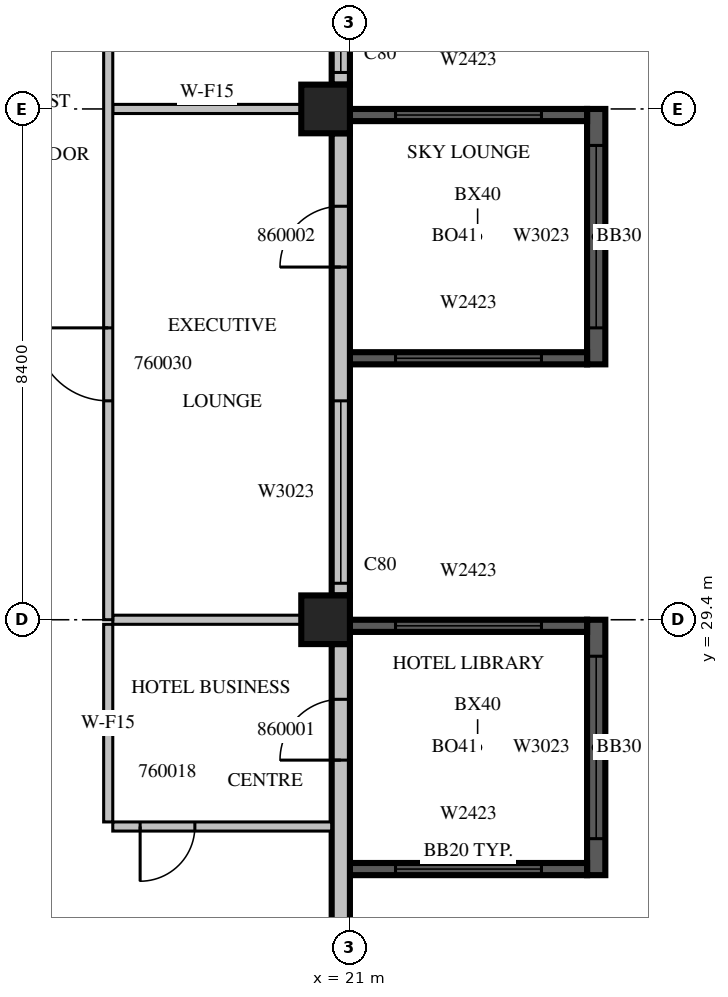
"""IFC4 building model, lengths in metres.
Left out: names, types, materials, properties, quantities, classifications, styles, units other than length and angle.
Written with IfcOpenShell. Run it as: python <this file> out.ifc"""

import sys

from ifc_helpers import new_model, si_unit, direction, frame, frame_2d, origin, origin_2d, place, context, subcontext, project, spatial, rectangle, extrude, source, transform, mapped, element, fill, save


model = new_model("IFC4")
c1 = context("Model", 3, precision=1e-05, world=origin(), true_north=direction((0.0, 1.0)))
c2 = subcontext(c1, "Body", "Model", "MODEL_VIEW")
j1 = project(units=[si_unit("LENGTHUNIT", "METRE"), si_unit("PLANEANGLEUNIT", "RADIAN")], contexts=[c1])
p1 = place(None, origin())
s1 = spatial("IfcSite", under=j1, at=p1, CompositionType="ELEMENT")
p2 = place(p1, origin())
s2 = spatial("IfcBuilding", under=s1, at=p2, CompositionType="ELEMENT")
p3 = place(p2, frame((0.0, 0.0, 261.4)))
s3 = spatial("IfcBuildingStorey", under=s2, at=p3, CompositionType="ELEMENT", Elevation=261.4)
m1 = source(origin(), c2, "Body", "SweptSolid", [
    extrude(rectangle(XDim=0.8, YDim=0.8, at=origin_2d()), origin(), (0.0, 0.0, 1.0), 3.8),
])
for number, where, z_axis, x_axis in (
    (1, (20.6, 29.4, 0.0), (0.0, 0.0, 1.0), (1.0, 0.0, 0.0)),
    (2, (20.6, 37.8, 0.0), (0.0, 0.0, 1.0), (1.0, 0.0, 0.0)),
):
    element("IfcColumn", number, at=place(p3, frame(where, z_axis=z_axis, x_axis=x_axis)), inside=s3, PredefinedType="COLUMN", context=c2, shape_type="MappedRepresentation", body=[
        mapped(m1, transform((0.0, 0.0, 0.0), scale=1.0)),
    ])
m2 = source(origin(), c2, "Body", "SweptSolid", [
    extrude(rectangle(XDim=4.2, YDim=0.3, at=frame_2d((2.1, 0.0))), origin(), (0.0, 0.0, 1.0), 3.4),
])
p4 = place(p3, frame((25.05, 25.2, 0.0), z_axis=(0.0, 0.0, 1.0), x_axis=(0.0, 1.0, 0.0)))
e3 = element("IfcWall", 3, at=p4, inside=s3, PredefinedType="SOLIDWALL", context=c2, shape_type="MappedRepresentation", body=[
    mapped(m2, transform((0.0, 0.0, 0.0), scale=1.0)),
])
m3 = source(origin(), c2, "Body", "SweptSolid", [
    extrude(rectangle(XDim=3.0, YDim=2.3, at=frame_2d((1.5, 1.15))), frame((0.0, 0.16, 0.0), z_axis=(0.0, -1.0, 0.0), x_axis=(1.0, 0.0, 0.0)), (0.0, 0.0, 1.0), 0.32),
])
p5 = place(p4, frame((0.6, 0.0, 0.6)))
e4 = element("IfcOpeningElement", 4, at=p5, cuts=e3, PredefinedType="OPENING", context=c2, shape_type="MappedRepresentation", body=[
    mapped(m3, transform((0.0, 0.0, 0.0), scale=1.0)),
])
m4 = source(origin(), c2, "Body", "SweptSolid", [
    extrude(rectangle(XDim=3.9, YDim=0.2, at=frame_2d((1.95, 0.0))), origin(), (0.0, 0.0, 1.0), 3.4),
])
p6 = place(p3, frame((21.0, 25.3, 0.0), z_axis=(0.0, 0.0, 1.0), x_axis=(1.0, 0.0, 0.0)))
e5 = element("IfcWall", 5, at=p6, inside=s3, PredefinedType="SOLIDWALL", context=c2, shape_type="MappedRepresentation", body=[
    mapped(m4, transform((0.0, 0.0, 0.0), scale=1.0)),
])
m5 = source(origin(), c2, "Body", "SweptSolid", [
    extrude(rectangle(XDim=2.4, YDim=2.3, at=frame_2d((1.2, 1.15))), frame((0.0, 0.11, 0.0), z_axis=(0.0, -1.0, 0.0), x_axis=(1.0, 0.0, 0.0)), (0.0, 0.0, 1.0), 0.22),
])
p7 = place(p6, frame((0.75, 0.0, 0.6)))
e6 = element("IfcOpeningElement", 6, at=p7, cuts=e5, PredefinedType="OPENING", context=c2, shape_type="MappedRepresentation", body=[
    mapped(m5, transform((0.0, 0.0, 0.0), scale=1.0)),
])
p8 = place(p3, frame((21.0, 29.3, 0.0), z_axis=(0.0, 0.0, 1.0), x_axis=(1.0, 0.0, 0.0)))
e7 = element("IfcWall", 7, at=p8, inside=s3, PredefinedType="SOLIDWALL", context=c2, shape_type="MappedRepresentation", body=[
    mapped(m4, transform((0.0, 0.0, 0.0), scale=1.0)),
])
p9 = place(p8, frame((0.75, 0.0, 0.6)))
e8 = element("IfcOpeningElement", 8, at=p9, cuts=e7, PredefinedType="OPENING", context=c2, shape_type="MappedRepresentation", body=[
    mapped(m5, transform((0.0, 0.0, 0.0), scale=1.0)),
])
p10 = place(p3, frame((25.05, 33.6, 0.0), z_axis=(0.0, 0.0, 1.0), x_axis=(0.0, 1.0, 0.0)))
e9 = element("IfcWall", 9, at=p10, inside=s3, PredefinedType="SOLIDWALL", context=c2, shape_type="MappedRepresentation", body=[
    mapped(m2, transform((0.0, 0.0, 0.0), scale=1.0)),
])
p11 = place(p10, frame((0.6, 0.0, 0.6)))
e10 = element("IfcOpeningElement", 10, at=p11, cuts=e9, PredefinedType="OPENING", context=c2, shape_type="MappedRepresentation", body=[
    mapped(m3, transform((0.0, 0.0, 0.0), scale=1.0)),
])
p12 = place(p3, frame((21.0, 33.7, 0.0), z_axis=(0.0, 0.0, 1.0), x_axis=(1.0, 0.0, 0.0)))
e11 = element("IfcWall", 11, at=p12, inside=s3, PredefinedType="SOLIDWALL", context=c2, shape_type="MappedRepresentation", body=[
    mapped(m4, transform((0.0, 0.0, 0.0), scale=1.0)),
])
p13 = place(p12, frame((0.75, 0.0, 0.6)))
e12 = element("IfcOpeningElement", 12, at=p13, cuts=e11, PredefinedType="OPENING", context=c2, shape_type="MappedRepresentation", body=[
    mapped(m5, transform((0.0, 0.0, 0.0), scale=1.0)),
])
p14 = place(p3, frame((21.0, 37.7, 0.0), z_axis=(0.0, 0.0, 1.0), x_axis=(1.0, 0.0, 0.0)))
e13 = element("IfcWall", 13, at=p14, inside=s3, PredefinedType="SOLIDWALL", context=c2, shape_type="MappedRepresentation", body=[
    mapped(m4, transform((0.0, 0.0, 0.0), scale=1.0)),
])
p15 = place(p14, frame((0.75, 0.0, 0.6)))
e14 = element("IfcOpeningElement", 14, at=p15, cuts=e13, PredefinedType="OPENING", context=c2, shape_type="MappedRepresentation", body=[
    mapped(m5, transform((0.0, 0.0, 0.0), scale=1.0)),
])
m6 = source(origin(), c2, "Body", "SweptSolid", [
    extrude(rectangle(XDim=7.2, YDim=0.3, at=frame_2d((3.6, 0.0))), origin(), (0.0, 0.0, 1.0), 3.4),
])
p16 = place(p3, frame((20.85, 21.8, 0.0), z_axis=(0.0, 0.0, 1.0), x_axis=(0.0, 1.0, 0.0)))
e15 = element("IfcWall", 15, at=p16, inside=s3, PredefinedType="STANDARD", context=c2, shape_type="MappedRepresentation", body=[
    mapped(m6, transform((0.0, 0.0, 0.0), scale=1.0)),
])
m7 = source(origin(), c2, "Body", "SweptSolid", [
    extrude(rectangle(XDim=1.8, YDim=2.3, at=frame_2d((0.9, 1.15))), frame((0.0, 0.16, 0.0), z_axis=(0.0, -1.0, 0.0), x_axis=(1.0, 0.0, 0.0)), (0.0, 0.0, 1.0), 0.32),
])
p17 = place(p16, frame((0.4, 0.0, 0.6)))
e16 = element("IfcOpeningElement", 16, at=p17, cuts=e15, PredefinedType="OPENING", context=c2, shape_type="MappedRepresentation", body=[
    mapped(m7, transform((0.0, 0.0, 0.0), scale=1.0)),
])
m8 = source(origin(), c2, "Body", "SweptSolid", [
    extrude(rectangle(XDim=1.0, YDim=2.1, at=frame_2d((0.5, 1.05))), frame((0.0, 0.16, 0.0), z_axis=(0.0, -1.0, 0.0), x_axis=(1.0, 0.0, 0.0)), (0.0, 0.0, 1.0), 0.32),
])
p18 = place(p16, frame((5.292, 0.0, 0.0)))
e17 = element("IfcOpeningElement", 17, at=p18, cuts=e15, PredefinedType="OPENING", context=c2, shape_type="MappedRepresentation", body=[
    mapped(m8, transform((0.0, 0.0, 0.0), scale=1.0)),
])
m9 = source(origin(), c2, "Body", "SweptSolid", [
    extrude(rectangle(XDim=7.6, YDim=0.3, at=frame_2d((3.8, 0.0))), origin(), (0.0, 0.0, 1.0), 3.4),
])
p19 = place(p3, frame((20.85, 29.8, 0.0), z_axis=(0.0, 0.0, 1.0), x_axis=(0.0, 1.0, 0.0)))
e18 = element("IfcWall", 18, at=p19, inside=s3, PredefinedType="STANDARD", context=c2, shape_type="MappedRepresentation", body=[
    mapped(m9, transform((0.0, 0.0, 0.0), scale=1.0)),
])
p20 = place(p19, frame((0.2, 0.0, 0.6)))
e19 = element("IfcOpeningElement", 19, at=p20, cuts=e18, PredefinedType="OPENING", context=c2, shape_type="MappedRepresentation", body=[
    mapped(m3, transform((0.0, 0.0, 0.0), scale=1.0)),
])
p21 = place(p19, frame((5.4, 0.0, 0.0)))
e20 = element("IfcOpeningElement", 20, at=p21, cuts=e18, PredefinedType="OPENING", context=c2, shape_type="MappedRepresentation", body=[
    mapped(m8, transform((0.0, 0.0, 0.0), scale=1.0)),
])
m10 = source(origin(), c2, "Body", "SweptSolid", [
    extrude(rectangle(XDim=3.8, YDim=0.3, at=frame_2d((1.9, 0.0))), origin(), (0.0, 0.0, 1.0), 3.4),
])
p22 = place(p3, frame((20.85, 38.2, 0.0), z_axis=(0.0, 0.0, 1.0), x_axis=(0.0, 1.0, 0.0)))
e21 = element("IfcWall", 21, at=p22, inside=s3, PredefinedType="STANDARD", context=c2, shape_type="MappedRepresentation", body=[
    mapped(m10, transform((0.0, 0.0, 0.0), scale=1.0)),
])
p23 = place(p22, frame((0.2, 0.0, 0.6)))
e22 = element("IfcOpeningElement", 22, at=p23, cuts=e21, PredefinedType="OPENING", context=c2, shape_type="MappedRepresentation", body=[
    mapped(m3, transform((0.0, 0.0, 0.0), scale=1.0)),
])
m11 = source(origin(), c2, "Body", "SweptSolid", [
    extrude(rectangle(XDim=3.6, YDim=0.15, at=frame_2d((1.8, 0.0))), origin(), (0.0, 0.0, 1.0), 3.4),
])
p24 = place(p3, frame((17.1, 26.0, 0.0), z_axis=(0.0, 0.0, 1.0), x_axis=(1.0, 0.0, 0.0)))
e23 = element("IfcWall", 23, at=p24, inside=s3, PredefinedType="PARTITIONING", context=c2, shape_type="MappedRepresentation", body=[
    mapped(m11, transform((0.0, 0.0, 0.0), scale=1.0)),
])
m12 = source(origin(), c2, "Body", "SweptSolid", [
    extrude(rectangle(XDim=0.9, YDim=2.1, at=frame_2d((0.45, 1.05))), frame((0.0, 0.085, 0.0), z_axis=(0.0, -1.0, 0.0), x_axis=(1.0, 0.0, 0.0)), (0.0, 0.0, 1.0), 0.17),
])
p25 = place(p24, frame((0.45, 0.0, 0.0)))
e24 = element("IfcOpeningElement", 24, at=p25, cuts=e23, PredefinedType="OPENING", context=c2, shape_type="MappedRepresentation", body=[
    mapped(m12, transform((0.0, 0.0, 0.0), scale=1.0)),
])
m13 = source(origin(), c2, "Body", "SweptSolid", [
    extrude(rectangle(XDim=3.25, YDim=0.15, at=frame_2d((1.625, 0.0))), origin(), (0.0, 0.0, 1.0), 3.4),
])
p26 = place(p3, frame((17.025, 29.325, 0.0), z_axis=(0.0, 0.0, 1.0), x_axis=(0.0, -1.0, 0.0)))
e25 = element("IfcWall", 25, at=p26, inside=s3, PredefinedType="PARTITIONING", context=c2, shape_type="MappedRepresentation", body=[
    mapped(m13, transform((0.0, 0.0, 0.0), scale=1.0)),
])
m14 = source(origin(), c2, "Body", "SweptSolid", [
    extrude(rectangle(XDim=3.101, YDim=0.15, at=frame_2d((1.55, 0.0))), origin(), (0.0, 0.0, 1.0), 3.4),
])
for number, where, z_axis, x_axis in (
    (26, (20.201, 29.4, 0.0), (0.0, 0.0, 1.0), (-1.0, 0.0, 0.0)),
    (27, (20.201, 37.8, 0.0), (0.0, 0.0, 1.0), (-1.0, 0.0, 0.0)),
):
    element("IfcWall", number, at=place(p3, frame(where, z_axis=z_axis, x_axis=x_axis)), inside=s3, PredefinedType="PARTITIONING", context=c2, shape_type="MappedRepresentation", body=[
        mapped(m14, transform((0.0, 0.0, 0.0), scale=1.0)),
    ])
m15 = source(origin(), c2, "Body", "SweptSolid", [
    extrude(rectangle(XDim=19.86, YDim=0.15, at=frame_2d((9.93, 0.0))), origin(), (0.0, 0.0, 1.0), 3.4),
])
p27 = place(p3, frame((17.025, 49.26, 0.0), z_axis=(0.0, 0.0, 1.0), x_axis=(0.0, -1.0, 0.0)))
e28 = element("IfcWall", 28, at=p27, inside=s3, PredefinedType="PARTITIONING", context=c2, shape_type="MappedRepresentation", body=[
    mapped(m15, transform((0.0, 0.0, 0.0), scale=1.0)),
])
m16 = source(origin(), c2, "Body", "SweptSolid", [
    extrude(rectangle(XDim=1.2, YDim=2.1, at=frame_2d((0.6, 1.05))), frame((0.0, 0.085, 0.0), z_axis=(0.0, -1.0, 0.0), x_axis=(1.0, 0.0, 0.0)), (0.0, 0.0, 1.0), 0.17),
])
p28 = place(p27, frame((15.06, 0.0, 0.0)))
e29 = element("IfcOpeningElement", 29, at=p28, cuts=e28, PredefinedType="OPENING", context=c2, shape_type="MappedRepresentation", body=[
    mapped(m16, transform((0.0, 0.0, 0.0), scale=1.0)),
])
m17 = source(origin(), c2, "Body", "SweptSolid", [
    extrude(rectangle(XDim=1.0, YDim=2.1, at=frame_2d((0.5, 1.05))), frame((0.0, 0.085, 0.0), z_axis=(0.0, -1.0, 0.0), x_axis=(1.0, 0.0, 0.0)), (0.0, 0.0, 1.0), 0.17),
])
p29 = place(p27, frame((6.63, 0.0, 0.0)))
e30 = element("IfcOpeningElement", 30, at=p29, cuts=e28, PredefinedType="OPENING", context=c2, shape_type="MappedRepresentation", body=[
    mapped(m17, transform((0.0, 0.0, 0.0), scale=1.0)),
])
m18 = source(origin(), c2, "Body", "SweptSolid", [
    extrude(rectangle(XDim=3.0, YDim=2.3, at=frame_2d((1.5, 1.15))), frame((0.0, 0.03, 0.0), z_axis=(0.0, -1.0, 0.0), x_axis=(1.0, 0.0, 0.0)), (0.0, 0.0, 1.0), 0.06),
])
p30 = place(p5, origin())
e31 = element("IfcWindow", 31, at=p30, inside=s3, PartitioningType="SINGLE_PANEL", PredefinedType="WINDOW", context=c2, shape_type="MappedRepresentation", body=[
    mapped(m18, transform((0.0, 0.0, 0.0), scale=1.0)),
])
fill(e4, e31)
m19 = source(origin(), c2, "Body", "SweptSolid", [
    extrude(rectangle(XDim=2.4, YDim=2.3, at=frame_2d((1.2, 1.15))), frame((0.0, 0.03, 0.0), z_axis=(0.0, -1.0, 0.0), x_axis=(1.0, 0.0, 0.0)), (0.0, 0.0, 1.0), 0.06),
])
p31 = place(p7, origin())
e32 = element("IfcWindow", 32, at=p31, inside=s3, PartitioningType="SINGLE_PANEL", PredefinedType="WINDOW", context=c2, shape_type="MappedRepresentation", body=[
    mapped(m19, transform((0.0, 0.0, 0.0), scale=1.0)),
])
fill(e6, e32)
p32 = place(p9, origin())
e33 = element("IfcWindow", 33, at=p32, inside=s3, PartitioningType="SINGLE_PANEL", PredefinedType="WINDOW", context=c2, shape_type="MappedRepresentation", body=[
    mapped(m19, transform((0.0, 0.0, 0.0), scale=1.0)),
])
fill(e8, e33)
p33 = place(p11, origin())
e34 = element("IfcWindow", 34, at=p33, inside=s3, PartitioningType="SINGLE_PANEL", PredefinedType="WINDOW", context=c2, shape_type="MappedRepresentation", body=[
    mapped(m18, transform((0.0, 0.0, 0.0), scale=1.0)),
])
fill(e10, e34)
p34 = place(p13, origin())
e35 = element("IfcWindow", 35, at=p34, inside=s3, PartitioningType="SINGLE_PANEL", PredefinedType="WINDOW", context=c2, shape_type="MappedRepresentation", body=[
    mapped(m19, transform((0.0, 0.0, 0.0), scale=1.0)),
])
fill(e12, e35)
p35 = place(p15, origin())
e36 = element("IfcWindow", 36, at=p35, inside=s3, PartitioningType="SINGLE_PANEL", PredefinedType="WINDOW", context=c2, shape_type="MappedRepresentation", body=[
    mapped(m19, transform((0.0, 0.0, 0.0), scale=1.0)),
])
fill(e14, e36)
p36 = place(p20, origin())
e37 = element("IfcWindow", 37, at=p36, inside=s3, PartitioningType="SINGLE_PANEL", PredefinedType="WINDOW", context=c2, shape_type="MappedRepresentation", body=[
    mapped(m18, transform((0.0, 0.0, 0.0), scale=1.0)),
])
fill(e19, e37)
p37 = place(p23, origin())
e38 = element("IfcWindow", 38, at=p37, inside=s3, PartitioningType="SINGLE_PANEL", PredefinedType="WINDOW", context=c2, shape_type="MappedRepresentation", body=[
    mapped(m18, transform((0.0, 0.0, 0.0), scale=1.0)),
])
fill(e22, e38)
m20 = source(origin(), c2, "Body", "SweptSolid", [
    extrude(rectangle(XDim=0.9, YDim=2.1, at=frame_2d((0.45, 1.05))), frame((0.0, 0.025, 0.0), z_axis=(0.0, -1.0, 0.0), x_axis=(1.0, 0.0, 0.0)), (0.0, 0.0, 1.0), 0.05),
])
p38 = place(p25, origin())
e39 = element("IfcDoor", 39, at=p38, inside=s3, OperationType="SINGLE_SWING_RIGHT", PredefinedType="DOOR", context=c2, shape_type="MappedRepresentation", body=[
    mapped(m20, transform((0.0, 0.0, 0.0), scale=1.0)),
])
fill(e24, e39)
m21 = source(origin(), c2, "Body", "SweptSolid", [
    extrude(rectangle(XDim=1.2, YDim=2.1, at=frame_2d((0.6, 1.05))), frame((0.0, 0.025, 0.0), z_axis=(0.0, -1.0, 0.0), x_axis=(1.0, 0.0, 0.0)), (0.0, 0.0, 1.0), 0.05),
])
p39 = place(p28, origin())
e40 = element("IfcDoor", 40, at=p39, inside=s3, OperationType="SINGLE_SWING_RIGHT", PredefinedType="DOOR", context=c2, shape_type="MappedRepresentation", body=[
    mapped(m21, transform((0.0, 0.0, 0.0), scale=1.0)),
])
fill(e29, e40)
m22 = source(origin(), c2, "Body", "SweptSolid", [
    extrude(rectangle(XDim=1.0, YDim=2.1, at=frame_2d((0.5, 1.05))), frame((0.0, 0.025, 0.0), z_axis=(0.0, -1.0, 0.0), x_axis=(1.0, 0.0, 0.0)), (0.0, 0.0, 1.0), 0.05),
])
p40 = place(p18, origin())
e41 = element("IfcDoor", 41, at=p40, inside=s3, OperationType="SINGLE_SWING_LEFT", PredefinedType="DOOR", context=c2, shape_type="MappedRepresentation", body=[
    mapped(m22, transform((0.0, 0.0, 0.0), scale=1.0)),
])
fill(e17, e41)
p41 = place(p21, origin())
e42 = element("IfcDoor", 42, at=p41, inside=s3, OperationType="SINGLE_SWING_LEFT", PredefinedType="DOOR", context=c2, shape_type="MappedRepresentation", body=[
    mapped(m22, transform((0.0, 0.0, 0.0), scale=1.0)),
])
fill(e20, e42)
save(model, sys.argv[1])
